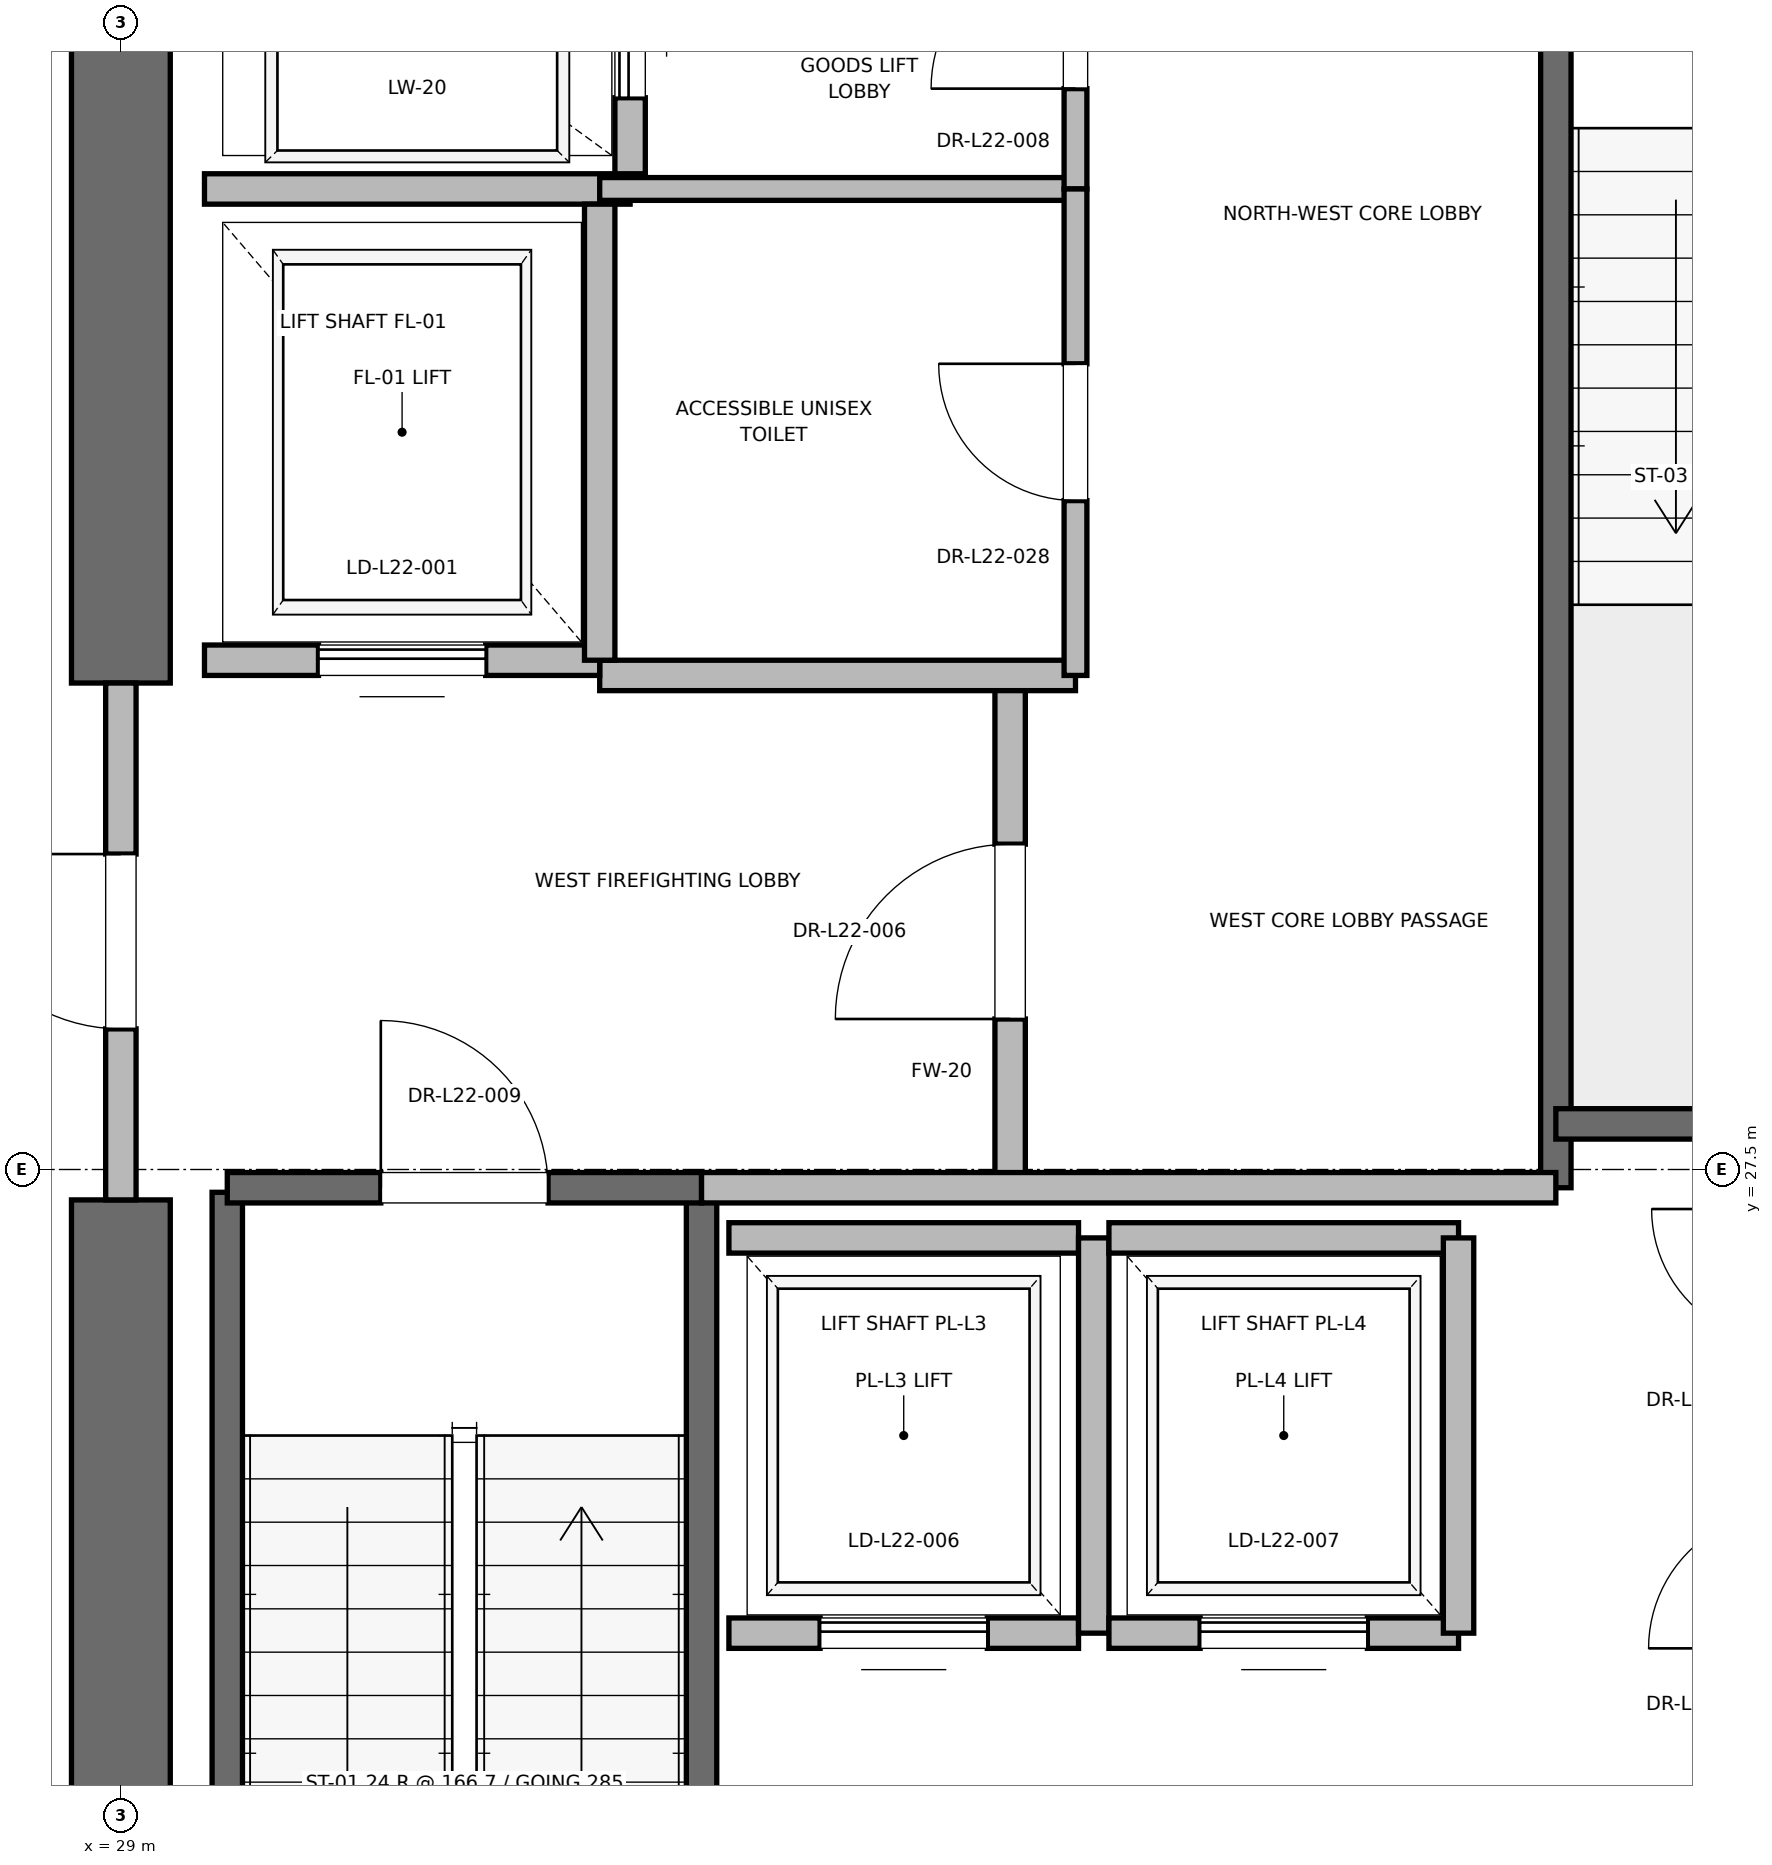
"""IFC4 building model, lengths in metres.
Left out: names, types, materials, properties, quantities, classifications, styles, units other than length and angle.
Written with IfcOpenShell. Run it as: python <this file> out.ifc"""

import sys

from ifc_helpers import new_model, si_unit, direction, frame, frame_2d, origin, place, context, subcontext, project, spatial, rectangle, extrude, element, fill, save


model = new_model("IFC4")
c1 = context("Model", 3, precision=1e-05, world=origin(), true_north=direction((0.0, 1.0)))
c2 = subcontext(c1, "Body", "Model", "MODEL_VIEW")
j1 = project(units=[si_unit("LENGTHUNIT", "METRE"), si_unit("PLANEANGLEUNIT", "RADIAN")], contexts=[c1])
p1 = place(None, origin())
s1 = spatial("IfcSite", under=j1, at=p1, CompositionType="ELEMENT")
p2 = place(p1, origin())
s2 = spatial("IfcBuilding", under=s1, at=p2, CompositionType="ELEMENT")
p3 = place(p2, frame((0.0, 0.0, 95.6)))
s3 = spatial("IfcBuildingStorey", under=s2, at=p3, CompositionType="ELEMENT", Elevation=95.6)
p4 = place(p3, frame((29.0, 18.5, 0.0), z_axis=(0.0, 0.0, 1.0), x_axis=(0.0, 1.0, 0.0)))
e1 = element("IfcWall", 1, at=p4, inside=s3, PredefinedType="SHEAR", context=c2, shape_type="SweptSolid", body=[
    extrude(rectangle(XDim=8.8, YDim=0.65, at=frame_2d((4.4, 0.0))), origin(), (0.0, 0.0, 1.0), 3.76),
])
p5 = place(p3, frame((29.0, 30.7, 0.0), z_axis=(0.0, 0.0, 1.0), x_axis=(0.0, 1.0, 0.0)))
e2 = element("IfcWall", 2, at=p5, inside=s3, PredefinedType="SHEAR", context=c2, shape_type="SweptSolid", body=[
    extrude(rectangle(XDim=5.8, YDim=0.65, at=frame_2d((2.9, 0.0))), origin(), (0.0, 0.0, 1.0), 3.76),
])
p6 = place(p3, frame((29.7, 19.2, 0.0), z_axis=(0.0, 0.0, 1.0), x_axis=(0.0, 1.0, 0.0)))
e3 = element("IfcWall", 3, at=p6, inside=s3, PredefinedType="SOLIDWALL", context=c2, shape_type="SweptSolid", body=[
    extrude(rectangle(XDim=8.15, YDim=0.2, at=frame_2d((4.075, 0.0))), origin(), (0.0, 0.0, 1.0), 3.76),
])
p7 = place(p3, frame((32.82, 18.6, 0.0), z_axis=(0.0, 0.0, 1.0), x_axis=(0.0, 1.0, 0.0)))
e4 = element("IfcWall", 4, at=p7, inside=s3, PredefinedType="SOLIDWALL", context=c2, shape_type="SweptSolid", body=[
    extrude(rectangle(XDim=8.78, YDim=0.2, at=frame_2d((4.39, 0.0))), origin(), (0.0, 0.0, 1.0), 3.76),
])
p8 = place(p3, frame((29.7, 27.38, 0.0), z_axis=(0.0, 0.0, 1.0), x_axis=(1.0, 0.0, 0.0)))
e5 = element("IfcWall", 5, at=p8, inside=s3, PredefinedType="SOLIDWALL", context=c2, shape_type="SweptSolid", body=[
    extrude(rectangle(XDim=3.12, YDim=0.2, at=frame_2d((1.56, 0.0))), origin(), (0.0, 0.0, 1.0), 3.76),
])
p9 = place(p8, frame((1.01, 0.0, 0.0)))
e6 = element("IfcOpeningElement", 6, at=p9, cuts=e5, PredefinedType="OPENING", context=c2, shape_type="SweptSolid", body=[
    extrude(rectangle(XDim=1.1, YDim=2.15, at=frame_2d((0.55, 1.075))), frame((0.0, 0.1, 0.0), z_axis=(0.0, -1.0, 0.0), x_axis=(1.0, 0.0, 0.0)), (0.0, 0.0, 1.0), 0.2),
])
p10 = place(p3, frame((38.44, 27.38, 0.0), z_axis=(0.0, 0.0, 1.0), x_axis=(0.0, 1.0, 0.0)))
e7 = element("IfcWall", 7, at=p10, inside=s3, PredefinedType="SOLIDWALL", context=c2, shape_type="SweptSolid", body=[
    extrude(rectangle(XDim=8.87, YDim=0.2, at=frame_2d((4.435, 0.0))), origin(), (0.0, 0.0, 1.0), 3.76),
])
p11 = place(p3, frame((38.44, 27.8, 0.0), z_axis=(0.0, 0.0, 1.0), x_axis=(1.0, 0.0, 0.0)))
e8 = element("IfcWall", 8, at=p11, inside=s3, PredefinedType="SOLIDWALL", context=c2, shape_type="SweptSolid", body=[
    extrude(rectangle(XDim=3.32, YDim=0.2, at=frame_2d((1.66, 0.0))), origin(), (0.0, 0.0, 1.0), 3.76),
])
p12 = place(p3, frame((34.85, 27.38, 0.0), z_axis=(0.0, 0.0, 1.0), x_axis=(0.0, 1.0, 0.0)))
e9 = element("IfcWall", 9, at=p12, inside=s3, PredefinedType="PARTITIONING", context=c2, shape_type="SweptSolid", body=[
    extrude(rectangle(XDim=3.37, YDim=0.2, at=frame_2d((1.685, 0.0))), origin(), (0.0, 0.0, 1.0), 3.76),
])
p13 = place(p12, frame((1.11, 0.0, 0.0)))
e10 = element("IfcOpeningElement", 10, at=p13, cuts=e9, PredefinedType="OPENING", context=c2, shape_type="SweptSolid", body=[
    extrude(rectangle(XDim=1.15, YDim=2.2, at=frame_2d((0.575, 1.1))), frame((0.0, 0.1, 0.0), z_axis=(0.0, -1.0, 0.0), x_axis=(1.0, 0.0, 0.0)), (0.0, 0.0, 1.0), 0.2),
])
p14 = place(p3, frame((29.0, 27.3, 0.0), z_axis=(0.0, 0.0, 1.0), x_axis=(0.0, 1.0, 0.0)))
e11 = element("IfcWall", 11, at=p14, inside=s3, PredefinedType="PARTITIONING", context=c2, shape_type="SweptSolid", body=[
    extrude(rectangle(XDim=3.4, YDim=0.2, at=frame_2d((1.7, 0.0))), origin(), (0.0, 0.0, 1.0), 2.54),
])
p15 = place(p14, frame((1.125, 0.0, 0.0)))
e12 = element("IfcOpeningElement", 12, at=p15, cuts=e11, PredefinedType="OPENING", context=c2, shape_type="SweptSolid", body=[
    extrude(rectangle(XDim=1.15, YDim=2.2, at=frame_2d((0.575, 1.1))), frame((0.0, 0.1, 0.0), z_axis=(0.0, -1.0, 0.0), x_axis=(1.0, 0.0, 0.0)), (0.0, 0.0, 1.0), 0.2),
])
p16 = place(p3, frame((32.82, 27.38, 0.0), z_axis=(0.0, 0.0, 1.0), x_axis=(1.0, 0.0, 0.0)))
e13 = element("IfcWall", 13, at=p16, inside=s3, PredefinedType="PARTITIONING", context=c2, shape_type="SweptSolid", body=[
    extrude(rectangle(XDim=5.62, YDim=0.2, at=frame_2d((2.81, 0.0))), origin(), (0.0, 0.0, 1.0), 3.76),
])
p17 = place(p3, frame((32.15, 30.75, 0.0), z_axis=(0.0, 0.0, 1.0), x_axis=(1.0, 0.0, 0.0)))
e14 = element("IfcWall", 14, at=p17, inside=s3, PredefinedType="PARTITIONING", context=c2, shape_type="SweptSolid", body=[
    extrude(rectangle(XDim=3.13, YDim=0.2, at=frame_2d((1.565, 0.0))), origin(), (0.0, 0.0, 1.0), 3.76),
])
p18 = place(p3, frame((29.55, 30.85, 0.0), z_axis=(0.0, 0.0, 1.0), x_axis=(1.0, 0.0, 0.0)))
e15 = element("IfcWall", 15, at=p18, inside=s3, PredefinedType="SOLIDWALL", context=c2, shape_type="SweptSolid", body=[
    extrude(rectangle(XDim=2.6, YDim=0.2, at=frame_2d((1.3, 0.0))), origin(), (0.0, 0.0, 1.0), 2.54),
])
p19 = place(p18, frame((0.75, 0.0, 0.0)))
e16 = element("IfcOpeningElement", 16, at=p19, cuts=e15, PredefinedType="OPENING", context=c2, shape_type="SweptSolid", body=[
    extrude(rectangle(XDim=1.1, YDim=2.2, at=frame_2d((0.55, 1.1))), frame((0.0, 0.1, 0.0), z_axis=(0.0, -1.0, 0.0), x_axis=(1.0, 0.0, 0.0)), (0.0, 0.0, 1.0), 0.2),
])
p20 = place(p3, frame((29.55, 33.95, 0.0), z_axis=(0.0, 0.0, 1.0), x_axis=(1.0, 0.0, 0.0)))
e17 = element("IfcWall", 17, at=p20, inside=s3, PredefinedType="SOLIDWALL", context=c2, shape_type="SweptSolid", body=[
    extrude(rectangle(XDim=2.8, YDim=0.2, at=frame_2d((1.4, 0.0))), origin(), (0.0, 0.0, 1.0), 3.76),
])
p21 = place(p3, frame((32.15, 30.85, 0.0), z_axis=(0.0, 0.0, 1.0), x_axis=(0.0, 1.0, 0.0)))
e18 = element("IfcWall", 18, at=p21, inside=s3, PredefinedType="SOLIDWALL", context=c2, shape_type="SweptSolid", body=[
    extrude(rectangle(XDim=3.0, YDim=0.2, at=frame_2d((1.5, 0.0))), origin(), (0.0, 0.0, 1.0), 3.76),
])
p22 = place(p3, frame((32.35, 34.05, 0.0), z_axis=(0.0, 0.0, 1.0), x_axis=(0.0, 1.0, 0.0)))
e19 = element("IfcWall", 19, at=p22, inside=s3, PredefinedType="SOLIDWALL", context=c2, shape_type="SweptSolid", body=[
    extrude(rectangle(XDim=2.1, YDim=0.2, at=frame_2d((1.05, 0.0))), origin(), (0.0, 0.0, 1.0), 3.76),
])
p23 = place(p22, frame((0.5, 0.0, 0.0)))
e20 = element("IfcOpeningElement", 20, at=p23, cuts=e19, PredefinedType="OPENING", context=c2, shape_type="SweptSolid", body=[
    extrude(rectangle(XDim=1.1, YDim=2.2, at=frame_2d((0.55, 1.1))), frame((0.0, 0.1, 0.0), z_axis=(0.0, -1.0, 0.0), x_axis=(1.0, 0.0, 0.0)), (0.0, 0.0, 1.0), 0.2),
])
p24 = place(p3, frame((33.0, 24.45, 0.0), z_axis=(0.0, 0.0, 1.0), x_axis=(1.0, 0.0, 0.0)))
e21 = element("IfcWall", 21, at=p24, inside=s3, PredefinedType="SOLIDWALL", context=c2, shape_type="SweptSolid", body=[
    extrude(rectangle(XDim=2.3, YDim=0.2, at=frame_2d((1.15, 0.0))), origin(), (0.0, 0.0, 1.0), 3.76),
])
p25 = place(p24, frame((0.6, 0.0, 0.0)))
e22 = element("IfcOpeningElement", 22, at=p25, cuts=e21, PredefinedType="OPENING", context=c2, shape_type="SweptSolid", body=[
    extrude(rectangle(XDim=1.1, YDim=2.2, at=frame_2d((0.55, 1.1))), frame((0.0, 0.1, 0.0), z_axis=(0.0, -1.0, 0.0), x_axis=(1.0, 0.0, 0.0)), (0.0, 0.0, 1.0), 0.2),
])
p26 = place(p3, frame((35.3, 27.05, 0.0), z_axis=(0.0, 0.0, 1.0), x_axis=(-1.0, 0.0, 0.0)))
e23 = element("IfcWall", 23, at=p26, inside=s3, PredefinedType="SOLIDWALL", context=c2, shape_type="SweptSolid", body=[
    extrude(rectangle(XDim=2.3, YDim=0.2, at=frame_2d((1.15, 0.0))), origin(), (0.0, 0.0, 1.0), 3.76),
])
p27 = place(p3, frame((35.4, 24.45, 0.0), z_axis=(0.0, 0.0, 1.0), x_axis=(0.0, 1.0, 0.0)))
e24 = element("IfcWall", 24, at=p27, inside=s3, PredefinedType="SOLIDWALL", context=c2, shape_type="SweptSolid", body=[
    extrude(rectangle(XDim=2.6, YDim=0.2, at=frame_2d((1.3, 0.0))), origin(), (0.0, 0.0, 1.0), 3.76),
])
p28 = place(p3, frame((35.5, 24.45, 0.0), z_axis=(0.0, 0.0, 1.0), x_axis=(1.0, 0.0, 0.0)))
e25 = element("IfcWall", 25, at=p28, inside=s3, PredefinedType="SOLIDWALL", context=c2, shape_type="SweptSolid", body=[
    extrude(rectangle(XDim=2.3, YDim=0.2, at=frame_2d((1.15, 0.0))), origin(), (0.0, 0.0, 1.0), 3.76),
])
p29 = place(p28, frame((0.6, 0.0, 0.0)))
e26 = element("IfcOpeningElement", 26, at=p29, cuts=e25, PredefinedType="OPENING", context=c2, shape_type="SweptSolid", body=[
    extrude(rectangle(XDim=1.1, YDim=2.2, at=frame_2d((0.55, 1.1))), frame((0.0, 0.1, 0.0), z_axis=(0.0, -1.0, 0.0), x_axis=(1.0, 0.0, 0.0)), (0.0, 0.0, 1.0), 0.2),
])
p30 = place(p3, frame((37.8, 27.05, 0.0), z_axis=(0.0, 0.0, 1.0), x_axis=(-1.0, 0.0, 0.0)))
e27 = element("IfcWall", 27, at=p30, inside=s3, PredefinedType="SOLIDWALL", context=c2, shape_type="SweptSolid", body=[
    extrude(rectangle(XDim=2.3, YDim=0.2, at=frame_2d((1.15, 0.0))), origin(), (0.0, 0.0, 1.0), 3.76),
])
p31 = place(p3, frame((37.8, 24.45, 0.0), z_axis=(0.0, 0.0, 1.0), x_axis=(0.0, 1.0, 0.0)))
e28 = element("IfcWall", 28, at=p31, inside=s3, PredefinedType="SOLIDWALL", context=c2, shape_type="SweptSolid", body=[
    extrude(rectangle(XDim=2.6, YDim=0.2, at=frame_2d((1.3, 0.0))), origin(), (0.0, 0.0, 1.0), 3.76),
])
p32 = place(p3, frame((32.15, 33.95, 0.0), z_axis=(0.0, 0.0, 1.0), x_axis=(1.0, 0.0, 0.0)))
e29 = element("IfcWall", 29, at=p32, inside=s3, PredefinedType="PARTITIONING", context=c2, shape_type="SweptSolid", body=[
    extrude(rectangle(XDim=3.13, YDim=0.15, at=frame_2d((1.565, 0.0))), origin(), (0.0, 0.0, 1.0), 2.85),
])
p33 = place(p3, frame((35.28, 33.95, 0.0), z_axis=(0.0, 0.0, 1.0), x_axis=(0.0, 1.0, 0.0)))
e30 = element("IfcWall", 30, at=p33, inside=s3, PredefinedType="PARTITIONING", context=c2, shape_type="SweptSolid", body=[
    extrude(rectangle(XDim=2.27, YDim=0.15, at=frame_2d((1.135, 0.0))), origin(), (0.0, 0.0, 1.0), 2.54),
])
p34 = place(p33, frame((0.66, 0.0, 0.0)))
e31 = element("IfcOpeningElement", 31, at=p34, cuts=e30, PredefinedType="OPENING", context=c2, shape_type="SweptSolid", body=[
    extrude(rectangle(XDim=0.95, YDim=2.15, at=frame_2d((0.475, 1.075))), frame((0.0, 0.075, 0.0), z_axis=(0.0, -1.0, 0.0), x_axis=(1.0, 0.0, 0.0)), (0.0, 0.0, 1.0), 0.15),
])
p35 = place(p3, frame((35.28, 30.75, 0.0), z_axis=(0.0, 0.0, 1.0), x_axis=(0.0, 1.0, 0.0)))
e32 = element("IfcWall", 32, at=p35, inside=s3, PredefinedType="PARTITIONING", context=c2, shape_type="SweptSolid", body=[
    extrude(rectangle(XDim=3.2, YDim=0.15, at=frame_2d((1.6, 0.0))), origin(), (0.0, 0.0, 1.0), 2.85),
])
p36 = place(p35, frame((1.15, 0.0, 0.0)))
e33 = element("IfcOpeningElement", 33, at=p36, cuts=e32, PredefinedType="OPENING", context=c2, shape_type="SweptSolid", body=[
    extrude(rectangle(XDim=0.9, YDim=2.1, at=frame_2d((0.45, 1.05))), frame((0.0, 0.075, 0.0), z_axis=(0.0, -1.0, 0.0), x_axis=(1.0, 0.0, 0.0)), (0.0, 0.0, 1.0), 0.15),
])
p37 = place(p9, origin())
e34 = element("IfcDoor", 34, at=p37, inside=s3, OperationType="SINGLE_SWING_LEFT", PredefinedType="DOOR", context=c2, shape_type="SweptSolid", body=[
    extrude(rectangle(XDim=1.1, YDim=2.15, at=frame_2d((0.55, 1.075))), frame((0.0, 0.025, 0.0), z_axis=(0.0, -1.0, 0.0), x_axis=(1.0, 0.0, 0.0)), (0.0, 0.0, 1.0), 0.05),
])
fill(e6, e34)
p38 = place(p13, origin())
e35 = element("IfcDoor", 35, at=p38, inside=s3, OperationType="SINGLE_SWING_LEFT", PredefinedType="DOOR", context=c2, shape_type="SweptSolid", body=[
    extrude(rectangle(XDim=1.15, YDim=2.2, at=frame_2d((0.575, 1.1))), frame((0.0, 0.025, 0.0), z_axis=(0.0, -1.0, 0.0), x_axis=(1.0, 0.0, 0.0)), (0.0, 0.0, 1.0), 0.05),
])
fill(e10, e35)
p39 = place(p15, origin())
e36 = element("IfcDoor", 36, at=p39, inside=s3, OperationType="SINGLE_SWING_RIGHT", PredefinedType="DOOR", context=c2, shape_type="SweptSolid", body=[
    extrude(rectangle(XDim=1.15, YDim=2.2, at=frame_2d((0.575, 1.1))), frame((0.0, 0.025, 0.0), z_axis=(0.0, -1.0, 0.0), x_axis=(1.0, 0.0, 0.0)), (0.0, 0.0, 1.0), 0.05),
])
fill(e12, e36)
p40 = place(p19, origin())
e37 = element("IfcDoor", 37, at=p40, inside=s3, OperationType="SLIDING_TO_RIGHT", PredefinedType="DOOR", context=c2, shape_type="SweptSolid", body=[
    extrude(rectangle(XDim=1.1, YDim=2.2, at=frame_2d((0.55, 1.1))), frame((0.0, 0.025, 0.0), z_axis=(0.0, -1.0, 0.0), x_axis=(1.0, 0.0, 0.0)), (0.0, 0.0, 1.0), 0.05),
])
fill(e16, e37)
p41 = place(p23, origin())
e38 = element("IfcDoor", 38, at=p41, inside=s3, OperationType="SLIDING_TO_RIGHT", PredefinedType="DOOR", context=c2, shape_type="SweptSolid", body=[
    extrude(rectangle(XDim=1.1, YDim=2.2, at=frame_2d((0.55, 1.1))), frame((0.0, 0.025, 0.0), z_axis=(0.0, -1.0, 0.0), x_axis=(1.0, 0.0, 0.0)), (0.0, 0.0, 1.0), 0.05),
])
fill(e20, e38)
p42 = place(p25, origin())
e39 = element("IfcDoor", 39, at=p42, inside=s3, OperationType="SLIDING_TO_RIGHT", PredefinedType="DOOR", context=c2, shape_type="SweptSolid", body=[
    extrude(rectangle(XDim=1.1, YDim=2.2, at=frame_2d((0.55, 1.1))), frame((0.0, 0.025, 0.0), z_axis=(0.0, -1.0, 0.0), x_axis=(1.0, 0.0, 0.0)), (0.0, 0.0, 1.0), 0.05),
])
fill(e22, e39)
p43 = place(p29, origin())
e40 = element("IfcDoor", 40, at=p43, inside=s3, OperationType="SLIDING_TO_RIGHT", PredefinedType="DOOR", context=c2, shape_type="SweptSolid", body=[
    extrude(rectangle(XDim=1.1, YDim=2.2, at=frame_2d((0.55, 1.1))), frame((0.0, 0.025, 0.0), z_axis=(0.0, -1.0, 0.0), x_axis=(1.0, 0.0, 0.0)), (0.0, 0.0, 1.0), 0.05),
])
fill(e26, e40)
p44 = place(p34, origin())
e41 = element("IfcDoor", 41, at=p44, inside=s3, OperationType="SINGLE_SWING_LEFT", PredefinedType="DOOR", context=c2, shape_type="SweptSolid", body=[
    extrude(rectangle(XDim=0.95, YDim=2.15, at=frame_2d((0.475, 1.075))), frame((0.0, 0.025, 0.0), z_axis=(0.0, -1.0, 0.0), x_axis=(1.0, 0.0, 0.0)), (0.0, 0.0, 1.0), 0.05),
])
fill(e31, e41)
p45 = place(p36, origin())
e42 = element("IfcDoor", 42, at=p45, inside=s3, OperationType="SINGLE_SWING_RIGHT", PredefinedType="DOOR", context=c2, shape_type="SweptSolid", body=[
    extrude(rectangle(XDim=0.9, YDim=2.1, at=frame_2d((0.45, 1.05))), frame((0.0, 0.025, 0.0), z_axis=(0.0, -1.0, 0.0), x_axis=(1.0, 0.0, 0.0)), (0.0, 0.0, 1.0), 0.05),
])
fill(e33, e42)
save(model, sys.argv[1])
